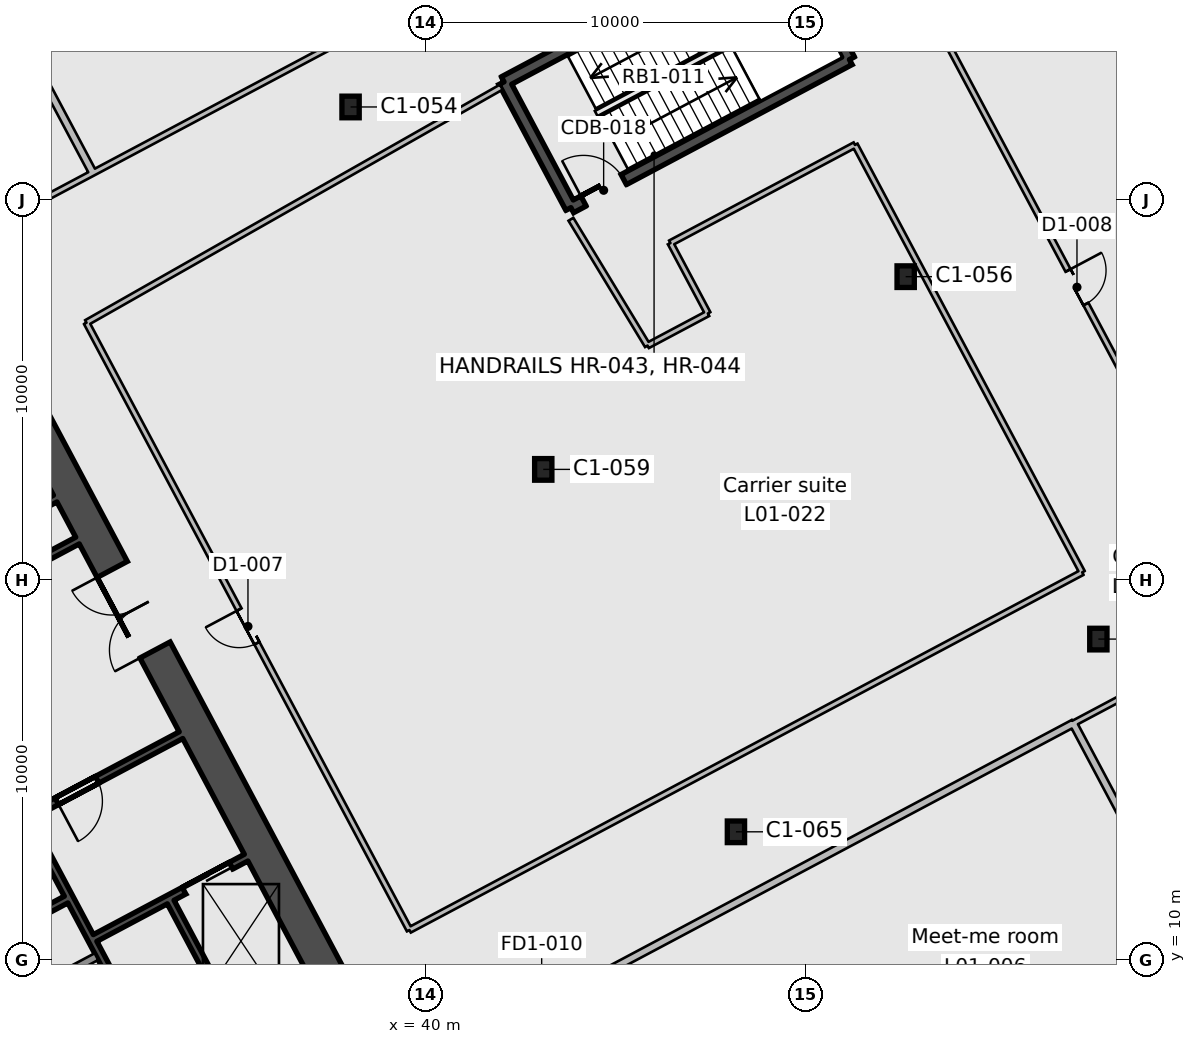
"""IFC4 building model, lengths in metres.
Left out: names, types, materials, properties, quantities, classifications, styles, units other than length and angle.
Written with IfcOpenShell. Run it as: python <this file> out.ifc"""

import sys

from ifc_helpers import new_model, si_unit, direction, frame, frame_2d, origin, origin_2d, place, context, subcontext, project, spatial, rectangle, i_section, extrude, element, fill, save


model = new_model("IFC4")
c1 = context("Model", 3, precision=1e-05, world=origin(), true_north=direction((0.0, 1.0)))
c2 = subcontext(c1, "Body", "Model", "MODEL_VIEW")
j1 = project(units=[si_unit("LENGTHUNIT", "METRE"), si_unit("PLANEANGLEUNIT", "RADIAN")], contexts=[c1])
p1 = place(None, origin())
s1 = spatial("IfcSite", under=j1, at=p1, CompositionType="ELEMENT")
p2 = place(p1, origin())
s2 = spatial("IfcBuilding", under=s1, at=p2, CompositionType="ELEMENT")
p3 = place(p2, frame((0.0, 0.0, 7.0)))
s3 = spatial("IfcBuildingStorey", under=s2, at=p3, CompositionType="ELEMENT", Elevation=7.0)
for number, where, z_axis, x_axis in (
    (1, (48.158, 13.374, 0.0), (0.0, 0.0, 1.0), (1.0, 0.0, 0.0)),
    (2, (57.694, 18.445, 0.0), (0.0, 0.0, 1.0), (1.0, 0.0, 0.0)),
    (3, (43.088, 22.91, 0.0), (0.0, 0.0, 1.0), (1.0, 0.0, 0.0)),
    (4, (52.624, 27.981, 0.0), (0.0, 0.0, 1.0), (1.0, 0.0, 0.0)),
    (5, (38.018, 32.446, 0.0), (0.0, 0.0, 1.0), (1.0, 0.0, 0.0)),
):
    element("IfcColumn", number, at=place(p3, frame(where, z_axis=z_axis, x_axis=x_axis)), inside=s3, PredefinedType="COLUMN", context=c2, shape_type="SweptSolid", body=[
        extrude(i_section(OverallWidth=0.455, OverallDepth=0.569, WebThickness=0.078, FlangeThickness=0.125, FilletRadius=0.015, at=origin_2d()), origin(), (0.0, 0.0, 1.0), 5.2),
    ])
p4 = place(p3, frame((37.849, 8.799, 0.0), z_axis=(0.0, 0.0, 1.0), x_axis=(-0.469465789982, 0.882950662289, 0.0)))
e6 = element("IfcWall", 6, at=p4, inside=s3, PredefinedType="SHEAR", context=c2, shape_type="SweptSolid", body=[
    extrude(rectangle(XDim=20.0, YDim=0.9, at=frame_2d((10.0, 0.0))), origin(), (0.0, 0.0, 1.0), 5.2),
])
p5 = place(p4, frame((10.6, 0.0, 0.0)))
e7 = element("IfcOpeningElement", 7, at=p5, cuts=e6, PredefinedType="OPENING", context=c2, shape_type="SweptSolid", body=[
    extrude(rectangle(XDim=2.4, YDim=2.4, at=frame_2d((1.2, 1.2))), frame((0.0, 0.46, 0.0), z_axis=(0.0, -1.0, 0.0), x_axis=(1.0, 0.0, 0.0)), (0.0, 0.0, 1.0), 0.92),
])
p6 = place(p3, frame((32.968, 7.223, 0.0), z_axis=(0.0, 0.0, 1.0), x_axis=(-0.469480409012, 0.88294288918, 0.0)))
e8 = element("IfcWall", 8, at=p6, inside=s3, PredefinedType="SHEAR", context=c2, shape_type="SweptSolid", body=[
    extrude(rectangle(XDim=7.3, YDim=0.2, at=frame_2d((3.65, 0.0))), origin(), (0.0, 0.0, 1.0), 5.2),
])
p7 = place(p3, frame((34.999, 8.303, 0.0), z_axis=(0.0, 0.0, 1.0), x_axis=(-0.4694665462, 0.882950260207, 0.0)))
e9 = element("IfcWall", 9, at=p7, inside=s3, PredefinedType="SHEAR", context=c2, shape_type="SweptSolid", body=[
    extrude(rectangle(XDim=3.65, YDim=0.2, at=frame_2d((1.825, 0.0))), origin(), (0.0, 0.0, 1.0), 5.2),
])
p8 = place(p3, frame((26.739, 7.648, 0.0), z_axis=(0.0, 0.0, 1.0), x_axis=(0.882934506056, 0.469496174655, 0.0)))
e10 = element("IfcWall", 10, at=p8, inside=s3, PredefinedType="SOLIDWALL", context=c2, shape_type="SweptSolid", body=[
    extrude(rectangle(XDim=5.2, YDim=0.2, at=frame_2d((2.6, 0.0))), origin(), (0.0, 0.0, 1.0), 5.2),
])
p9 = place(p3, frame((31.296, 10.581, 0.0), z_axis=(0.0, 0.0, 1.0), x_axis=(0.882960433586, 0.469447412093, 0.0)))
e11 = element("IfcWall", 11, at=p9, inside=s3, PredefinedType="SHEAR", context=c2, shape_type="SweptSolid", body=[
    extrude(rectangle(XDim=4.5, YDim=0.2, at=frame_2d((2.25, 0.0))), origin(), (0.0, 0.0, 1.0), 5.2),
])
p10 = place(p9, frame((2.65, 0.0, 0.0)))
e12 = element("IfcOpeningElement", 12, at=p10, cuts=e11, PredefinedType="OPENING", context=c2, shape_type="SweptSolid", body=[
    extrude(rectangle(XDim=1.4, YDim=2.4, at=frame_2d((0.7, 1.2))), frame((0.0, 0.11, 0.0), z_axis=(0.0, -1.0, 0.0), x_axis=(1.0, 0.0, 0.0)), (0.0, 0.0, 1.0), 0.22),
])
p11 = place(p3, frame((25.941, 9.15, 0.0), z_axis=(0.0, 0.0, 1.0), x_axis=(0.882953967957, 0.469459572775, 0.0)))
e13 = element("IfcWall", 13, at=p11, inside=s3, PredefinedType="SHEAR", context=c2, shape_type="SweptSolid", body=[
    extrude(rectangle(XDim=5.2, YDim=0.2, at=frame_2d((2.6, 0.0))), origin(), (0.0, 0.0, 1.0), 5.2),
])
p12 = place(p3, frame((24.726, 11.222, 0.0), z_axis=(0.0, 0.0, 1.0), x_axis=(0.882940221191, 0.469485426614, 0.0)))
e14 = element("IfcWall", 14, at=p12, inside=s3, PredefinedType="SHEAR", context=c2, shape_type="SweptSolid", body=[
    extrude(rectangle(XDim=10.0, YDim=0.2, at=frame_2d((5.0, 0.0))), origin(), (0.0, 0.0, 1.0), 5.2),
])
p13 = place(p12, frame((6.3, 0.0, 0.0)))
e15 = element("IfcOpeningElement", 15, at=p13, cuts=e14, PredefinedType="OPENING", context=c2, shape_type="SweptSolid", body=[
    extrude(rectangle(XDim=1.2, YDim=2.1, at=frame_2d((0.6, 1.05))), frame((0.0, 0.11, 0.0), z_axis=(0.0, -1.0, 0.0), x_axis=(1.0, 0.0, 0.0)), (0.0, 0.0, 1.0), 0.22),
])
p14 = place(p12, frame((2.25, 0.0, 0.0)))
e16 = element("IfcOpeningElement", 16, at=p14, cuts=e14, PredefinedType="OPENING", context=c2, shape_type="SweptSolid", body=[
    extrude(rectangle(XDim=0.9, YDim=2.1, at=frame_2d((0.45, 1.05))), frame((0.0, 0.11, 0.0), z_axis=(0.0, -1.0, 0.0), x_axis=(1.0, 0.0, 0.0)), (0.0, 0.0, 1.0), 0.22),
])
p15 = place(p3, frame((23.769, 17.282, 0.0), z_axis=(0.0, 0.0, 1.0), x_axis=(0.882940221191, 0.469485426614, 0.0)))
e17 = element("IfcWall", 17, at=p15, inside=s3, PredefinedType="SHEAR", context=c2, shape_type="SweptSolid", body=[
    extrude(rectangle(XDim=8.0, YDim=0.2, at=frame_2d((4.0, 0.0))), origin(), (0.0, 0.0, 1.0), 5.2),
])
p16 = place(p3, frame((23.182, 18.385, 0.0), z_axis=(0.0, 0.0, 1.0), x_axis=(0.88295287151, 0.469461634952, 0.0)))
e18 = element("IfcWall", 18, at=p16, inside=s3, PredefinedType="SHEAR", context=c2, shape_type="SweptSolid", body=[
    extrude(rectangle(XDim=8.0, YDim=0.2, at=frame_2d((4.0, 0.0))), origin(), (0.0, 0.0, 1.0), 5.2),
])
p17 = place(p3, frame((49.384, 37.004, 0.0), z_axis=(0.0, 0.0, 1.0), x_axis=(0.46946936446, -0.882948761726, 0.0)))
e19 = element("IfcWall", 19, at=p17, inside=s3, PredefinedType="SHEAR", context=c2, shape_type="SweptSolid", body=[
    extrude(rectangle(XDim=3.75, YDim=0.3, at=frame_2d((1.875, 0.0))), origin(), (0.0, 0.0, 1.0), 5.2),
])
p18 = place(p3, frame((51.145, 33.693, 0.0), z_axis=(0.0, 0.0, 1.0), x_axis=(-0.882945809314, -0.469474917132, 0.0)))
e20 = element("IfcWall", 20, at=p18, inside=s3, PredefinedType="SHEAR", context=c2, shape_type="SweptSolid", body=[
    extrude(rectangle(XDim=8.3, YDim=0.3, at=frame_2d((4.15, 0.0))), origin(), (0.0, 0.0, 1.0), 5.2),
])
p19 = place(p18, frame((6.725, 0.0, 0.0)))
e21 = element("IfcOpeningElement", 21, at=p19, cuts=e20, PredefinedType="OPENING", context=c2, shape_type="SweptSolid", body=[
    extrude(rectangle(XDim=1.2, YDim=2.1, at=frame_2d((0.6, 1.05))), frame((0.0, 0.16, 0.0), z_axis=(0.0, -1.0, 0.0), x_axis=(1.0, 0.0, 0.0)), (0.0, 0.0, 1.0), 0.32),
])
p20 = place(p3, frame((43.816, 29.796, 0.0), z_axis=(0.0, 0.0, 1.0), x_axis=(-0.46946936446, 0.882948761726, 0.0)))
e22 = element("IfcWall", 22, at=p20, inside=s3, PredefinedType="SHEAR", context=c2, shape_type="SweptSolid", body=[
    extrude(rectangle(XDim=3.75, YDim=0.3, at=frame_2d((1.875, 0.0))), origin(), (0.0, 0.0, 1.0), 5.2),
])
p21 = place(p3, frame((42.055, 33.107, 0.0), z_axis=(0.0, 0.0, 1.0), x_axis=(0.882945809314, 0.469474917132, 0.0)))
e23 = element("IfcWall", 23, at=p21, inside=s3, PredefinedType="SHEAR", context=c2, shape_type="SweptSolid", body=[
    extrude(rectangle(XDim=8.3, YDim=0.3, at=frame_2d((4.15, 0.0))), origin(), (0.0, 0.0, 1.0), 5.2),
])
p22 = place(p3, frame((0.0, 14.1, 0.0), z_axis=(0.0, 0.0, 1.0), x_axis=(0.882942713919, 0.469480738623, 0.0)))
e24 = element("IfcWall", 24, at=p22, inside=s3, PredefinedType="PARTITIONING", context=c2, shape_type="SweptSolid", body=[
    extrude(rectangle(XDim=36.591, YDim=0.15, at=frame_2d((18.296, 0.0))), origin(), (0.0, 0.0, 1.0), 4.75),
])
p23 = place(p22, frame((30.95, 0.0, 0.0)))
e25 = element("IfcOpeningElement", 25, at=p23, cuts=e24, PredefinedType="OPENING", context=c2, shape_type="SweptSolid", body=[
    extrude(rectangle(XDim=1.0, YDim=2.1, at=frame_2d((0.5, 1.05))), frame((0.0, 0.085, 0.0), z_axis=(0.0, -1.0, 0.0), x_axis=(1.0, 0.0, 0.0)), (0.0, 0.0, 1.0), 0.17),
])
p24 = place(p22, frame((20.45, 0.0, 0.0)))
e26 = element("IfcOpeningElement", 26, at=p24, cuts=e24, PredefinedType="OPENING", context=c2, shape_type="SweptSolid", body=[
    extrude(rectangle(XDim=1.0, YDim=2.1, at=frame_2d((0.5, 1.05))), frame((0.0, 0.085, 0.0), z_axis=(0.0, -1.0, 0.0), x_axis=(1.0, 0.0, 0.0)), (0.0, 0.0, 1.0), 0.17),
])
p25 = place(p22, frame((17.75, 0.0, 0.0)))
e27 = element("IfcOpeningElement", 27, at=p25, cuts=e24, PredefinedType="OPENING", context=c2, shape_type="SweptSolid", body=[
    extrude(rectangle(XDim=1.0, YDim=2.1, at=frame_2d((0.5, 1.05))), frame((0.0, 0.085, 0.0), z_axis=(0.0, -1.0, 0.0), x_axis=(1.0, 0.0, 0.0)), (0.0, 0.0, 1.0), 0.17),
])
p26 = place(p3, frame((57.041, 16.229, 0.0), z_axis=(0.0, 0.0, 1.0), x_axis=(-0.882947975476, -0.469470843188, 0.0)))
e28 = element("IfcWall", 28, at=p26, inside=s3, PredefinedType="PARTITIONING", context=c2, shape_type="SweptSolid", body=[
    extrude(rectangle(XDim=49.2, YDim=0.2, at=frame_2d((24.6, 0.0))), origin(), (0.0, 0.0, 1.0), 4.75),
])
p27 = place(p26, frame((27.75, 0.0, 0.0)))
e29 = element("IfcOpeningElement", 29, at=p27, cuts=e28, PredefinedType="OPENING", context=c2, shape_type="SweptSolid", body=[
    extrude(rectangle(XDim=1.0, YDim=2.1, at=frame_2d((0.5, 1.05))), frame((0.0, 0.11, 0.0), z_axis=(0.0, -1.0, 0.0), x_axis=(1.0, 0.0, 0.0)), (0.0, 0.0, 1.0), 0.22),
])
p28 = place(p26, frame((24.05, 0.0, 0.0)))
e30 = element("IfcOpeningElement", 30, at=p28, cuts=e28, PredefinedType="OPENING", context=c2, shape_type="SweptSolid", body=[
    extrude(rectangle(XDim=1.0, YDim=2.1, at=frame_2d((0.5, 1.05))), frame((0.0, 0.11, 0.0), z_axis=(0.0, -1.0, 0.0), x_axis=(1.0, 0.0, 0.0)), (0.0, 0.0, 1.0), 0.22),
])
p29 = place(p26, frame((15.35, 0.0, 0.0)))
e31 = element("IfcOpeningElement", 31, at=p29, cuts=e28, PredefinedType="OPENING", context=c2, shape_type="SweptSolid", body=[
    extrude(rectangle(XDim=1.0, YDim=2.1, at=frame_2d((0.5, 1.05))), frame((0.0, 0.11, 0.0), z_axis=(0.0, -1.0, 0.0), x_axis=(1.0, 0.0, 0.0)), (0.0, 0.0, 1.0), 0.22),
])
p30 = place(p3, frame((31.23, 30.726, 0.0), z_axis=(0.0, 0.0, 1.0), x_axis=(-0.469403649121, 0.882983699845, 0.0)))
e32 = element("IfcWall", 32, at=p30, inside=s3, PredefinedType="PARTITIONING", context=c2, shape_type="SweptSolid", body=[
    extrude(rectangle(XDim=5.532, YDim=0.2, at=frame_2d((2.766, 0.0))), origin(), (0.0, 0.0, 1.0), 4.75),
])
p31 = place(p3, frame((32.308, 31.279, 0.0), z_axis=(0.0, 0.0, 1.0), x_axis=(0.882939951573, 0.469485933673, 0.0)))
e33 = element("IfcWall", 33, at=p31, inside=s3, PredefinedType="PARTITIONING", context=c2, shape_type="SweptSolid", body=[
    extrude(rectangle(XDim=20.239, YDim=0.15, at=frame_2d((10.12, 0.0))), origin(), (0.0, 0.0, 1.0), 4.75),
])
p32 = place(p31, frame((9.65, 0.0, 0.0)))
e34 = element("IfcOpeningElement", 34, at=p32, cuts=e33, PredefinedType="OPENING", context=c2, shape_type="SweptSolid", body=[
    extrude(rectangle(XDim=1.0, YDim=2.1, at=frame_2d((0.5, 1.05))), frame((0.0, 0.085, 0.0), z_axis=(0.0, -1.0, 0.0), x_axis=(1.0, 0.0, 0.0)), (0.0, 0.0, 1.0), 0.17),
])
p33 = place(p3, frame((48.541, 15.56, 0.0), z_axis=(0.0, 0.0, 1.0), x_axis=(-0.882933406877, -0.469498241765, 0.0)))
e35 = element("IfcWall", 35, at=p33, inside=s3, PredefinedType="PARTITIONING", context=c2, shape_type="SweptSolid", body=[
    extrude(rectangle(XDim=10.164, YDim=0.15, at=frame_2d((5.082, 0.0))), origin(), (0.0, 0.0, 1.0), 4.75),
])
p34 = place(p3, frame((39.567, 10.788, 0.0), z_axis=(0.0, 0.0, 1.0), x_axis=(-0.469474056812, 0.882946266757, 0.0)))
e36 = element("IfcWall", 36, at=p34, inside=s3, PredefinedType="PARTITIONING", context=c2, shape_type="SweptSolid", body=[
    extrude(rectangle(XDim=18.101, YDim=0.15, at=frame_2d((9.05, 0.0))), origin(), (0.0, 0.0, 1.0), 4.75),
])
p35 = place(p34, frame((8.55, 0.0, 0.0)))
e37 = element("IfcOpeningElement", 37, at=p35, cuts=e36, PredefinedType="OPENING", context=c2, shape_type="SweptSolid", body=[
    extrude(rectangle(XDim=1.0, YDim=2.1, at=frame_2d((0.5, 1.05))), frame((0.0, 0.085, 0.0), z_axis=(0.0, -1.0, 0.0), x_axis=(1.0, 0.0, 0.0)), (0.0, 0.0, 1.0), 0.17),
])
p36 = place(p3, frame((31.069, 26.77, 0.0), z_axis=(0.0, 0.0, 1.0), x_axis=(0.86954617394, 0.493851649168, 0.0)))
e38 = element("IfcWall", 38, at=p36, inside=s3, PredefinedType="PARTITIONING", context=c2, shape_type="SweptSolid", body=[
    extrude(rectangle(XDim=12.55, YDim=0.15, at=frame_2d((6.275, 0.0))), origin(), (0.0, 0.0, 1.0), 4.75),
])
p37 = place(p3, frame((43.816, 29.491, 0.0), z_axis=(0.0, 0.0, 1.0), x_axis=(0.518473208291, -0.855093873376, 0.0)))
e39 = element("IfcWall", 39, at=p37, inside=s3, PredefinedType="PARTITIONING", context=c2, shape_type="SweptSolid", body=[
    extrude(rectangle(XDim=1.325, YDim=0.15, at=frame_2d((0.663, 0.0))), origin(), (0.0, 0.0, 1.0), 4.75),
])
p38 = place(p3, frame((45.831, 26.167, 0.0), z_axis=(0.0, 0.0, 1.0), x_axis=(-0.518386189645, 0.855146629757, 0.0)))
e40 = element("IfcWall", 40, at=p38, inside=s3, PredefinedType="PARTITIONING", context=c2, shape_type="SweptSolid", body=[
    extrude(rectangle(XDim=2.562, YDim=0.15, at=frame_2d((1.281, 0.0))), origin(), (0.0, 0.0, 1.0), 4.75),
])
p39 = place(p3, frame((47.42, 27.012, 0.0), z_axis=(0.0, 0.0, 1.0), x_axis=(-0.882911879422, -0.469538723829, 0.0)))
e41 = element("IfcWall", 41, at=p39, inside=s3, PredefinedType="PARTITIONING", context=c2, shape_type="SweptSolid", body=[
    extrude(rectangle(XDim=1.8, YDim=0.15, at=frame_2d((0.9, 0.0))), origin(), (0.0, 0.0, 1.0), 4.75),
])
p40 = place(p3, frame((57.034, 16.225, 0.0), z_axis=(0.0, 0.0, 1.0), x_axis=(0.469482945701, -0.882941540361, 0.0)))
e42 = element("IfcWall", 42, at=p40, inside=s3, PredefinedType="PARTITIONING", context=c2, shape_type="SweptSolid", body=[
    extrude(rectangle(XDim=8.75, YDim=0.2, at=frame_2d((4.375, 0.0))), origin(), (0.0, 0.0, 1.0), 4.75),
])
p41 = place(p3, frame((46.434, 28.866, 0.0), z_axis=(0.0, 0.0, 1.0), x_axis=(0.882942083458, 0.469481924316, 0.0)))
e43 = element("IfcWall", 43, at=p41, inside=s3, PredefinedType="PARTITIONING", context=c2, shape_type="SweptSolid", body=[
    extrude(rectangle(XDim=5.5, YDim=0.15, at=frame_2d((2.75, 0.0))), origin(), (0.0, 0.0, 1.0), 4.75),
])
p42 = place(p3, frame((51.29, 31.448, 0.0), z_axis=(0.0, 0.0, 1.0), x_axis=(0.469459757109, -0.882953869947, 0.0)))
e44 = element("IfcWall", 44, at=p42, inside=s3, PredefinedType="PARTITIONING", context=c2, shape_type="SweptSolid", body=[
    extrude(rectangle(XDim=12.738, YDim=0.15, at=frame_2d((6.369, 0.0))), origin(), (0.0, 0.0, 1.0), 4.75),
])
p43 = place(p3, frame((57.27, 20.201, 0.0), z_axis=(0.0, 0.0, 1.0), x_axis=(-0.882965394181, -0.469438081837, 0.0)))
e45 = element("IfcWall", 45, at=p43, inside=s3, PredefinedType="PARTITIONING", context=c2, shape_type="SweptSolid", body=[
    extrude(rectangle(XDim=9.886, YDim=0.15, at=frame_2d((4.943, 0.0))), origin(), (0.0, 0.0, 1.0), 4.75),
])
p44 = place(p3, frame((47.42, 27.012, 0.0), z_axis=(0.0, 0.0, 1.0), x_axis=(-0.469489562011, 0.882938022266, 0.0)))
e46 = element("IfcWall", 46, at=p44, inside=s3, PredefinedType="PARTITIONING", context=c2, shape_type="SweptSolid", body=[
    extrude(rectangle(XDim=2.1, YDim=0.15, at=frame_2d((1.05, 0.0))), origin(), (0.0, 0.0, 1.0), 4.75),
])
p45 = place(p3, frame((57.041, 16.229, 0.0), z_axis=(0.0, 0.0, 1.0), x_axis=(0.882918476145, 0.469526319265, 0.0)))
e47 = element("IfcWall", 47, at=p45, inside=s3, PredefinedType="PARTITIONING", context=c2, shape_type="SweptSolid", body=[
    extrude(rectangle(XDim=5.467, YDim=0.15, at=frame_2d((2.733, 0.0))), origin(), (0.0, 0.0, 1.0), 4.75),
])
p46 = place(p3, frame((52.366, 36.665, 0.0), z_axis=(0.0, 0.0, 1.0), x_axis=(0.469480933333, -0.882942610387, 0.0)))
e48 = element("IfcWall", 48, at=p46, inside=s3, PredefinedType="PARTITIONING", context=c2, shape_type="SweptSolid", body=[
    extrude(rectangle(XDim=20.239, YDim=0.15, at=frame_2d((10.12, 0.0))), origin(), (0.0, 0.0, 1.0), 4.75),
])
p47 = place(p46, frame((9.65, 0.0, 0.0)))
e49 = element("IfcOpeningElement", 49, at=p47, cuts=e48, PredefinedType="OPENING", context=c2, shape_type="SweptSolid", body=[
    extrude(rectangle(XDim=1.0, YDim=2.1, at=frame_2d((0.5, 1.05))), frame((0.0, 0.085, 0.0), z_axis=(0.0, -1.0, 0.0), x_axis=(1.0, 0.0, 0.0)), (0.0, 0.0, 1.0), 0.17),
])
p48 = place(p3, frame((57.299, 39.208, 0.0), z_axis=(0.0, 0.0, 1.0), x_axis=(0.469480728433, -0.882942719337, 0.0)))
e50 = element("IfcWall", 50, at=p48, inside=s3, PredefinedType="PARTITIONING", context=c2, shape_type="SweptSolid", body=[
    extrude(rectangle(XDim=28.934, YDim=0.15, at=frame_2d((14.467, 0.0))), origin(), (0.0, 0.0, 1.0), 4.75),
])
p49 = place(p5, origin())
e51 = element("IfcDoor", 51, at=p49, inside=s3, OperationType="DOUBLE_DOOR_SINGLE_SWING", PredefinedType="DOOR", context=c2, shape_type="SweptSolid", body=[
    extrude(rectangle(XDim=2.4, YDim=2.4, at=frame_2d((1.2, 1.2))), frame((0.0, 0.025, 0.0), z_axis=(0.0, -1.0, 0.0), x_axis=(1.0, 0.0, 0.0)), (0.0, 0.0, 1.0), 0.05),
])
fill(e7, e51)
p50 = place(p13, frame((1.2, 0.0, 0.0), z_axis=(0.0, 0.0, 1.0), x_axis=(-1.0, 0.0, 0.0)))
e52 = element("IfcDoor", 52, at=p50, inside=s3, OperationType="SINGLE_SWING_RIGHT", PredefinedType="DOOR", context=c2, shape_type="SweptSolid", body=[
    extrude(rectangle(XDim=1.2, YDim=2.1, at=frame_2d((0.6, 1.05))), frame((0.0, 0.025, 0.0), z_axis=(0.0, -1.0, 0.0), x_axis=(1.0, 0.0, 0.0)), (0.0, 0.0, 1.0), 0.05),
])
fill(e15, e52)
p51 = place(p10, origin())
e53 = element("IfcDoor", 53, at=p51, inside=s3, OperationType="DOUBLE_DOOR_SLIDING", PredefinedType="DOOR", context=c2, shape_type="SweptSolid", body=[
    extrude(rectangle(XDim=1.4, YDim=2.4, at=frame_2d((0.7, 1.2))), frame((0.0, 0.025, 0.0), z_axis=(0.0, -1.0, 0.0), x_axis=(1.0, 0.0, 0.0)), (0.0, 0.0, 1.0), 0.05),
])
fill(e12, e53)
p52 = place(p19, frame((1.2, 0.0, 0.0), z_axis=(0.0, 0.0, 1.0), x_axis=(-1.0, 0.0, 0.0)))
e54 = element("IfcDoor", 54, at=p52, inside=s3, OperationType="SINGLE_SWING_LEFT", PredefinedType="DOOR", context=c2, shape_type="SweptSolid", body=[
    extrude(rectangle(XDim=1.2, YDim=2.1, at=frame_2d((0.6, 1.05))), frame((0.0, 0.025, 0.0), z_axis=(0.0, -1.0, 0.0), x_axis=(1.0, 0.0, 0.0)), (0.0, 0.0, 1.0), 0.05),
])
fill(e21, e54)
p53 = place(p47, origin())
e55 = element("IfcDoor", 55, at=p53, inside=s3, OperationType="SINGLE_SWING_LEFT", PredefinedType="DOOR", context=c2, shape_type="SweptSolid", body=[
    extrude(rectangle(XDim=1.0, YDim=2.1, at=frame_2d((0.5, 1.05))), frame((0.0, 0.025, 0.0), z_axis=(0.0, -1.0, 0.0), x_axis=(1.0, 0.0, 0.0)), (0.0, 0.0, 1.0), 0.05),
])
fill(e49, e55)
p54 = place(p35, origin())
e56 = element("IfcDoor", 56, at=p54, inside=s3, OperationType="SINGLE_SWING_RIGHT", PredefinedType="DOOR", context=c2, shape_type="SweptSolid", body=[
    extrude(rectangle(XDim=1.0, YDim=2.1, at=frame_2d((0.5, 1.05))), frame((0.0, 0.025, 0.0), z_axis=(0.0, -1.0, 0.0), x_axis=(1.0, 0.0, 0.0)), (0.0, 0.0, 1.0), 0.05),
])
fill(e37, e56)
save(model, sys.argv[1])
